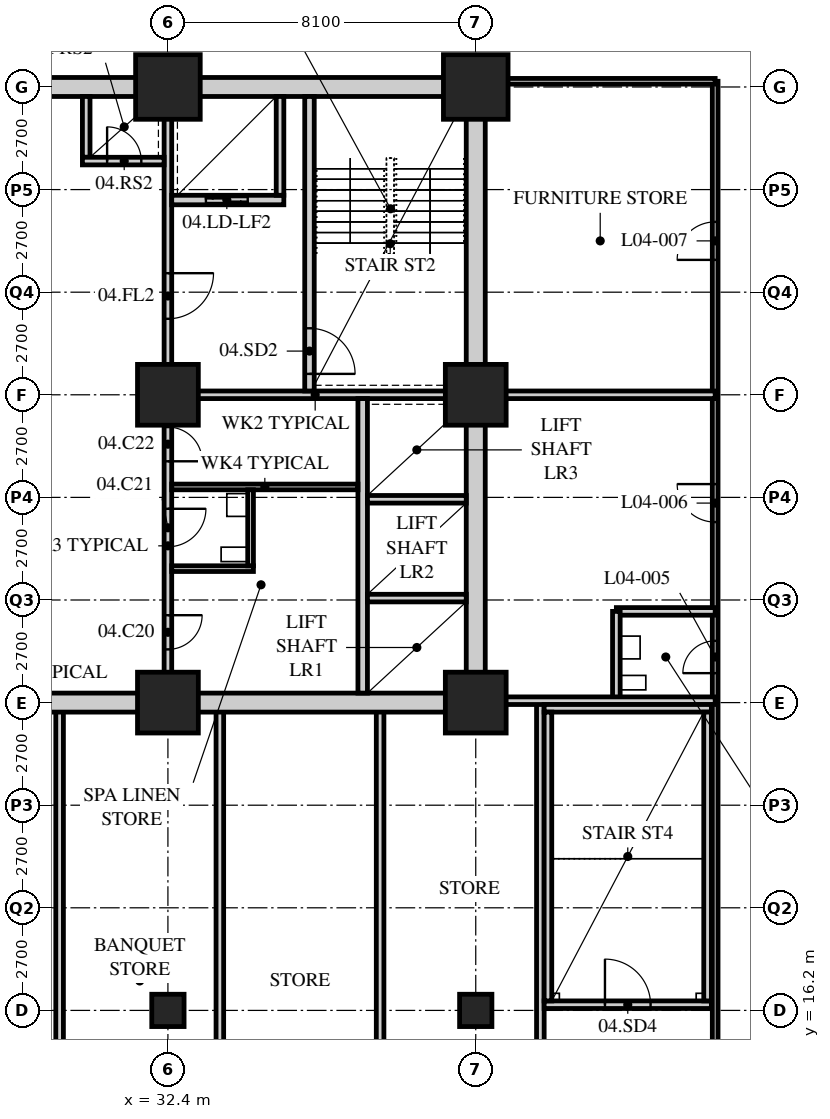
"""IFC4 building model, lengths in metres.
Left out: names, types, materials, properties, quantities, classifications, styles, units other than length and angle.
Written with IfcOpenShell. Run it as: python <this file> out.ifc"""

import sys

from ifc_helpers import new_model, si_unit, direction, frame, frame_2d, origin, origin_2d, place, context, subcontext, project, spatial, rectangle, hollow_rectangle, extrude, element, fill, save


model = new_model("IFC4")
c1 = context("Model", 3, precision=1e-05, world=origin(), true_north=direction((0.0, 1.0)))
c2 = subcontext(c1, "Body", "Model", "MODEL_VIEW")
j1 = project(units=[si_unit("LENGTHUNIT", "METRE"), si_unit("PLANEANGLEUNIT", "RADIAN")], contexts=[c1])
p1 = place(None, origin())
s1 = spatial("IfcSite", under=j1, at=p1, CompositionType="ELEMENT")
p2 = place(p1, origin())
s2 = spatial("IfcBuilding", under=s1, at=p2, CompositionType="ELEMENT")
p3 = place(p2, frame((0.0, 0.0, 22.2)))
s3 = spatial("IfcBuildingStorey", under=s2, at=p3, CompositionType="ELEMENT", Elevation=22.2)
p4 = place(p3, frame((32.4, 16.2, 0.0), z_axis=(0.0, 0.0, 1.0), x_axis=(1.0, 0.0, 0.0)))
e1 = element("IfcColumn", 1, at=p4, inside=s3, PredefinedType="COLUMN", context=c2, shape_type="SweptSolid", body=[
    extrude(hollow_rectangle(XDim=0.85, YDim=0.85, WallThickness=0.085, at=origin_2d()), origin(), (0.0, 0.0, 1.0), 5.4),
])
for number, where, z_axis, x_axis in (
    (2, (32.4, 24.3, 0.0), (0.0, 0.0, 1.0), (1.0, 0.0, 0.0)),
    (3, (32.4, 32.4, 0.0), (0.0, 0.0, 1.0), (1.0, 0.0, 0.0)),
):
    element("IfcColumn", number, at=place(p3, frame(where, z_axis=z_axis, x_axis=x_axis)), inside=s3, PredefinedType="COLUMN", context=c2, shape_type="SweptSolid", body=[
        extrude(hollow_rectangle(XDim=1.6, YDim=1.6, WallThickness=0.15, at=origin_2d()), origin(), (0.0, 0.0, 1.0), 5.4),
    ])
p5 = place(p3, frame((32.4, 40.5, 0.0), z_axis=(0.0, 0.0, 1.0), x_axis=(1.0, 0.0, 0.0)))
e4 = element("IfcColumn", 4, at=p5, inside=s3, PredefinedType="COLUMN", context=c2, shape_type="SweptSolid", body=[
    extrude(hollow_rectangle(XDim=1.7, YDim=1.7, WallThickness=0.16, at=origin_2d()), origin(), (0.0, 0.0, 1.0), 5.4),
])
p6 = place(p3, frame((40.5, 16.2, 0.0), z_axis=(0.0, 0.0, 1.0), x_axis=(1.0, 0.0, 0.0)))
e5 = element("IfcColumn", 5, at=p6, inside=s3, PredefinedType="COLUMN", context=c2, shape_type="SweptSolid", body=[
    extrude(hollow_rectangle(XDim=0.85, YDim=0.85, WallThickness=0.085, at=origin_2d()), origin(), (0.0, 0.0, 1.0), 5.4),
])
for number, where, z_axis, x_axis in (
    (6, (40.5, 24.3, 0.0), (0.0, 0.0, 1.0), (1.0, 0.0, 0.0)),
    (7, (40.5, 32.4, 0.0), (0.0, 0.0, 1.0), (1.0, 0.0, 0.0)),
):
    element("IfcColumn", number, at=place(p3, frame(where, z_axis=z_axis, x_axis=x_axis)), inside=s3, PredefinedType="COLUMN", context=c2, shape_type="SweptSolid", body=[
        extrude(hollow_rectangle(XDim=1.6, YDim=1.6, WallThickness=0.15, at=origin_2d()), origin(), (0.0, 0.0, 1.0), 5.4),
    ])
p7 = place(p3, frame((40.5, 40.5, 0.0), z_axis=(0.0, 0.0, 1.0), x_axis=(1.0, 0.0, 0.0)))
e8 = element("IfcColumn", 8, at=p7, inside=s3, PredefinedType="COLUMN", context=c2, shape_type="SweptSolid", body=[
    extrude(hollow_rectangle(XDim=1.7, YDim=1.7, WallThickness=0.16, at=origin_2d()), origin(), (0.0, 0.0, 1.0), 5.4),
])
p8 = place(p3, frame((46.8, 9.9, 0.0), z_axis=(0.0, 0.0, 1.0), x_axis=(0.0, 1.0, 0.0)))
e9 = element("IfcWall", 9, at=p8, inside=s3, PredefinedType="PARTITIONING", context=c2, shape_type="SweptSolid", body=[
    extrude(rectangle(XDim=30.75, YDim=0.15, at=frame_2d((15.375, 0.0))), origin(), (0.0, 0.0, 1.0), 5.19),
])
p9 = place(p8, frame((15.175, 0.0, 0.0)))
e10 = element("IfcOpeningElement", 10, at=p9, cuts=e9, PredefinedType="OPENING", context=c2, shape_type="SweptSolid", body=[
    extrude(rectangle(XDim=0.85, YDim=2.1, at=frame_2d((0.425, 1.05))), frame((0.0, 0.085, 0.0), z_axis=(0.0, -1.0, 0.0), x_axis=(1.0, 0.0, 0.0)), (0.0, 0.0, 1.0), 0.17),
])
p10 = place(p8, frame((19.15, 0.0, 0.0)))
e11 = element("IfcOpeningElement", 11, at=p10, cuts=e9, PredefinedType="OPENING", context=c2, shape_type="SweptSolid", body=[
    extrude(rectangle(XDim=1.0, YDim=2.1, at=frame_2d((0.5, 1.05))), frame((0.0, 0.085, 0.0), z_axis=(0.0, -1.0, 0.0), x_axis=(1.0, 0.0, 0.0)), (0.0, 0.0, 1.0), 0.17),
])
p11 = place(p8, frame((26.05, 0.0, 0.0)))
e12 = element("IfcOpeningElement", 12, at=p11, cuts=e9, PredefinedType="OPENING", context=c2, shape_type="SweptSolid", body=[
    extrude(rectangle(XDim=1.0, YDim=2.1, at=frame_2d((0.5, 1.05))), frame((0.0, 0.085, 0.0), z_axis=(0.0, -1.0, 0.0), x_axis=(1.0, 0.0, 0.0)), (0.0, 0.0, 1.0), 0.17),
])
p12 = place(p3, frame((46.8, 40.65, 0.0), z_axis=(0.0, 0.0, 1.0), x_axis=(-1.0, 0.0, 0.0)))
e13 = element("IfcWall", 13, at=p12, inside=s3, PredefinedType="PARTITIONING", context=c2, shape_type="SweptSolid", body=[
    extrude(rectangle(XDim=6.168, YDim=0.15, at=frame_2d((3.084, 0.0))), origin(), (0.0, 0.0, 1.0), 4.428),
])
p13 = place(p3, frame((40.5, 32.4, 0.0), z_axis=(0.0, 0.0, 1.0), x_axis=(1.0, 0.0, 0.0)))
e14 = element("IfcWall", 14, at=p13, inside=s3, PredefinedType="SOLIDWALL", context=c2, shape_type="SweptSolid", body=[
    extrude(rectangle(XDim=6.3, YDim=0.2, at=frame_2d((3.15, 0.0))), origin(), (0.0, 0.0, 1.0), 4.428),
])
p14 = place(p3, frame((46.8, 26.7, 0.0), z_axis=(0.0, 0.0, 1.0), x_axis=(-1.0, 0.0, 0.0)))
e15 = element("IfcWall", 15, at=p14, inside=s3, PredefinedType="SOLIDWALL", context=c2, shape_type="SweptSolid", body=[
    extrude(rectangle(XDim=2.6, YDim=0.2, at=frame_2d((1.3, 0.0))), origin(), (0.0, 0.0, 1.0), 5.19),
])
p15 = place(p3, frame((44.2, 24.3, 0.0), z_axis=(0.0, 0.0, 1.0), x_axis=(0.0, 1.0, 0.0)))
e16 = element("IfcWall", 16, at=p15, inside=s3, PredefinedType="SOLIDWALL", context=c2, shape_type="SweptSolid", body=[
    extrude(rectangle(XDim=2.4, YDim=0.2, at=frame_2d((1.2, 0.0))), origin(), (0.0, 0.0, 1.0), 5.19),
])
for number, where, z_axis, x_axis in (
    (17, (33.767, 9.9, 0.0), (0.0, 0.0, 1.0), (0.0, 1.0, 0.0)),
    (18, (37.983, 9.9, 0.0), (0.0, 0.0, 1.0), (0.0, 1.0, 0.0)),
    (19, (42.2, 9.9, 0.0), (0.0, 0.0, 1.0), (0.0, 1.0, 0.0)),
    (20, (29.55, 9.9, 0.0), (0.0, 0.0, 1.0), (0.0, 1.0, 0.0)),
):
    element("IfcWall", number, at=place(p3, frame(where, z_axis=z_axis, x_axis=x_axis)), inside=s3, PredefinedType="SOLIDWALL", context=c2, shape_type="SweptSolid", body=[
        extrude(rectangle(XDim=14.4, YDim=0.2, at=frame_2d((7.2, 0.0))), origin(), (0.0, 0.0, 1.0), 5.19),
    ])
p16 = place(p3, frame((40.5, 24.35, 0.0), z_axis=(0.0, 0.0, 1.0), x_axis=(1.0, 0.0, 0.0)))
e21 = element("IfcWall", 21, at=p16, inside=s3, PredefinedType="SOLIDWALL", context=c2, shape_type="SweptSolid", body=[
    extrude(rectangle(XDim=6.3, YDim=0.2, at=frame_2d((3.15, 0.0))), origin(), (0.0, 0.0, 1.0), 4.428),
])
p17 = place(p3, frame((15.95, 24.3, 0.0), z_axis=(0.0, 0.0, 1.0), x_axis=(1.0, 0.0, 0.0)))
e22 = element("IfcWall", 22, at=p17, inside=s3, PredefinedType="SOLIDWALL", context=c2, shape_type="SweptSolid", body=[
    extrude(rectangle(XDim=24.8, YDim=0.5, at=frame_2d((12.4, 0.0))), origin(), (0.0, 0.0, 1.0), 4.428),
])
p18 = place(p17, frame((11.5, 0.0, 0.0)))
e23 = element("IfcOpeningElement", 23, at=p18, cuts=e22, PredefinedType="OPENING", context=c2, shape_type="SweptSolid", body=[
    extrude(rectangle(XDim=1.8, YDim=2.4, at=frame_2d((0.9, 1.2))), frame((0.0, 0.26, 0.0), z_axis=(0.0, -1.0, 0.0), x_axis=(1.0, 0.0, 0.0)), (0.0, 0.0, 1.0), 0.52),
])
p19 = place(p3, frame((15.95, 40.5, 0.0), z_axis=(0.0, 0.0, 1.0), x_axis=(1.0, 0.0, 0.0)))
e24 = element("IfcWall", 24, at=p19, inside=s3, PredefinedType="SOLIDWALL", context=c2, shape_type="SweptSolid", body=[
    extrude(rectangle(XDim=24.8, YDim=0.5, at=frame_2d((12.4, 0.0))), origin(), (0.0, 0.0, 1.0), 4.428),
])
p20 = place(p19, frame((11.5, 0.0, 0.0)))
e25 = element("IfcOpeningElement", 25, at=p20, cuts=e24, PredefinedType="OPENING", context=c2, shape_type="SweptSolid", body=[
    extrude(rectangle(XDim=1.8, YDim=2.4, at=frame_2d((0.9, 1.2))), frame((0.0, 0.26, 0.0), z_axis=(0.0, -1.0, 0.0), x_axis=(1.0, 0.0, 0.0)), (0.0, 0.0, 1.0), 0.52),
])
p21 = place(p3, frame((40.5, 24.55, 0.0), z_axis=(0.0, 0.0, 1.0), x_axis=(0.0, 1.0, 0.0)))
e26 = element("IfcWall", 26, at=p21, inside=s3, PredefinedType="SOLIDWALL", context=c2, shape_type="SweptSolid", body=[
    extrude(rectangle(XDim=15.7, YDim=0.5, at=frame_2d((7.85, 0.0))), origin(), (0.0, 0.0, 1.0), 4.428),
])
p22 = place(p3, frame((32.3, 32.4, 0.0), z_axis=(0.0, 0.0, 1.0), x_axis=(1.0, 0.0, 0.0)))
e27 = element("IfcWall", 27, at=p22, inside=s3, PredefinedType="SOLIDWALL", context=c2, shape_type="SweptSolid", body=[
    extrude(rectangle(XDim=7.95, YDim=0.2, at=frame_2d((3.975, 0.0))), origin(), (0.0, 0.0, 1.0), 4.428),
])
p23 = place(p3, frame((32.4, 32.5, 0.0), z_axis=(0.0, 0.0, 1.0), x_axis=(0.0, 1.0, 0.0)))
e28 = element("IfcWall", 28, at=p23, inside=s3, PredefinedType="SOLIDWALL", context=c2, shape_type="SweptSolid", body=[
    extrude(rectangle(XDim=7.75, YDim=0.2, at=frame_2d((3.875, 0.0))), origin(), (0.0, 0.0, 1.0), 4.428),
])
p24 = place(p23, frame((1.9, 0.0, 0.0)))
e29 = element("IfcOpeningElement", 29, at=p24, cuts=e28, PredefinedType="OPENING", context=c2, shape_type="SweptSolid", body=[
    extrude(rectangle(XDim=1.2, YDim=2.1, at=frame_2d((0.6, 1.05))), frame((0.0, 0.11, 0.0), z_axis=(0.0, -1.0, 0.0), x_axis=(1.0, 0.0, 0.0)), (0.0, 0.0, 1.0), 0.22),
])
p25 = place(p3, frame((37.525, 24.55, 0.0), z_axis=(0.0, 0.0, 1.0), x_axis=(0.0, 1.0, 0.0)))
e30 = element("IfcWall", 30, at=p25, inside=s3, PredefinedType="SOLIDWALL", context=c2, shape_type="SweptSolid", body=[
    extrude(rectangle(XDim=7.75, YDim=0.25, at=frame_2d((3.875, 0.0))), origin(), (0.0, 0.0, 1.0), 5.19),
])
for number, where, z_axis, x_axis in (
    (31, (37.65, 27.05, 0.0), (0.0, 0.0, 1.0), (1.0, 0.0, 0.0)),
    (32, (37.65, 29.65, 0.0), (0.0, 0.0, 1.0), (1.0, 0.0, 0.0)),
):
    element("IfcWall", number, at=place(p3, frame(where, z_axis=z_axis, x_axis=x_axis)), inside=s3, PredefinedType="SOLIDWALL", context=c2, shape_type="SweptSolid", body=[
        extrude(rectangle(XDim=2.6, YDim=0.2, at=frame_2d((1.3, 0.0))), origin(), (0.0, 0.0, 1.0), 5.19),
    ])
p26 = place(p3, frame((36.125, 32.5, 0.0), z_axis=(0.0, 0.0, 1.0), x_axis=(0.0, 1.0, 0.0)))
e33 = element("IfcWall", 33, at=p26, inside=s3, PredefinedType="SOLIDWALL", context=c2, shape_type="SweptSolid", body=[
    extrude(rectangle(XDim=7.75, YDim=0.25, at=frame_2d((3.875, 0.0))), origin(), (0.0, 0.0, 1.0), 5.19),
])
p27 = place(p26, frame((0.45, 0.0, 0.0)))
e34 = element("IfcOpeningElement", 34, at=p27, cuts=e33, PredefinedType="OPENING", context=c2, shape_type="SweptSolid", body=[
    extrude(rectangle(XDim=1.2, YDim=2.1, at=frame_2d((0.6, 1.05))), frame((0.0, 0.135, 0.0), z_axis=(0.0, -1.0, 0.0), x_axis=(1.0, 0.0, 0.0)), (0.0, 0.0, 1.0), 0.27),
])
p28 = place(p3, frame((32.5, 37.525, 0.0), z_axis=(0.0, 0.0, 1.0), x_axis=(1.0, 0.0, 0.0)))
e35 = element("IfcWall", 35, at=p28, inside=s3, PredefinedType="SOLIDWALL", context=c2, shape_type="SweptSolid", body=[
    extrude(rectangle(XDim=2.95, YDim=0.25, at=frame_2d((1.475, 0.0))), origin(), (0.0, 0.0, 1.0), 5.19),
])
p29 = place(p28, frame((0.9, 0.0, 0.0)))
e36 = element("IfcOpeningElement", 36, at=p29, cuts=e35, PredefinedType="OPENING", context=c2, shape_type="SweptSolid", body=[
    extrude(rectangle(XDim=1.1, YDim=2.4, at=frame_2d((0.55, 1.2))), frame((0.0, 0.135, 0.0), z_axis=(0.0, -1.0, 0.0), x_axis=(1.0, 0.0, 0.0)), (0.0, 0.0, 1.0), 0.27),
])
p30 = place(p3, frame((35.35, 37.65, 0.0), z_axis=(0.0, 0.0, 1.0), x_axis=(0.0, 1.0, 0.0)))
e37 = element("IfcWall", 37, at=p30, inside=s3, PredefinedType="SOLIDWALL", context=c2, shape_type="SweptSolid", body=[
    extrude(rectangle(XDim=2.6, YDim=0.2, at=frame_2d((1.3, 0.0))), origin(), (0.0, 0.0, 1.0), 5.19),
])
p31 = place(p3, frame((30.25, 38.65, 0.0), z_axis=(0.0, 0.0, 1.0), x_axis=(0.0, 1.0, 0.0)))
e38 = element("IfcWall", 38, at=p31, inside=s3, PredefinedType="SOLIDWALL", context=c2, shape_type="SweptSolid", body=[
    extrude(rectangle(XDim=1.6, YDim=0.2, at=frame_2d((0.8, 0.0))), origin(), (0.0, 0.0, 1.0), 5.19),
])
p32 = place(p3, frame((30.15, 38.55, 0.0), z_axis=(0.0, 0.0, 1.0), x_axis=(1.0, 0.0, 0.0)))
e39 = element("IfcWall", 39, at=p32, inside=s3, PredefinedType="SOLIDWALL", context=c2, shape_type="SweptSolid", body=[
    extrude(rectangle(XDim=2.15, YDim=0.2, at=frame_2d((1.075, 0.0))), origin(), (0.0, 0.0, 1.0), 5.19),
])
p33 = place(p32, frame((0.65, 0.0, 0.0)))
e40 = element("IfcOpeningElement", 40, at=p33, cuts=e39, PredefinedType="OPENING", context=c2, shape_type="SweptSolid", body=[
    extrude(rectangle(XDim=0.9, YDim=2.1, at=frame_2d((0.45, 1.05))), frame((0.0, 0.11, 0.0), z_axis=(0.0, -1.0, 0.0), x_axis=(1.0, 0.0, 0.0)), (0.0, 0.0, 1.0), 0.22),
])
p34 = place(p3, frame((32.4, 24.55, 0.0), z_axis=(0.0, 0.0, 1.0), x_axis=(0.0, 1.0, 0.0)))
e41 = element("IfcWall", 41, at=p34, inside=s3, PredefinedType="PARTITIONING", context=c2, shape_type="SweptSolid", body=[
    extrude(rectangle(XDim=7.75, YDim=0.2, at=frame_2d((3.875, 0.0))), origin(), (0.0, 0.0, 1.0), 4.428),
])
p35 = place(p34, frame((1.15, 0.0, 0.0)))
e42 = element("IfcOpeningElement", 42, at=p35, cuts=e41, PredefinedType="OPENING", context=c2, shape_type="SweptSolid", body=[
    extrude(rectangle(XDim=0.9, YDim=2.1, at=frame_2d((0.45, 1.05))), frame((0.0, 0.11, 0.0), z_axis=(0.0, -1.0, 0.0), x_axis=(1.0, 0.0, 0.0)), (0.0, 0.0, 1.0), 0.22),
])
p36 = place(p34, frame((3.85, 0.0, 0.0)))
e43 = element("IfcOpeningElement", 43, at=p36, cuts=e41, PredefinedType="OPENING", context=c2, shape_type="SweptSolid", body=[
    extrude(rectangle(XDim=1.0, YDim=2.1, at=frame_2d((0.5, 1.05))), frame((0.0, 0.11, 0.0), z_axis=(0.0, -1.0, 0.0), x_axis=(1.0, 0.0, 0.0)), (0.0, 0.0, 1.0), 0.22),
])
p37 = place(p34, frame((6.1, 0.0, 0.0)))
e44 = element("IfcOpeningElement", 44, at=p37, cuts=e41, PredefinedType="OPENING", context=c2, shape_type="SweptSolid", body=[
    extrude(rectangle(XDim=0.9, YDim=2.1, at=frame_2d((0.45, 1.05))), frame((0.0, 0.11, 0.0), z_axis=(0.0, -1.0, 0.0), x_axis=(1.0, 0.0, 0.0)), (0.0, 0.0, 1.0), 0.22),
])
p38 = place(p3, frame((32.5, 27.825, 0.0), z_axis=(0.0, 0.0, 1.0), x_axis=(1.0, 0.0, 0.0)))
e45 = element("IfcWall", 45, at=p38, inside=s3, PredefinedType="PARTITIONING", context=c2, shape_type="SweptSolid", body=[
    extrude(rectangle(XDim=2.15, YDim=0.15, at=frame_2d((1.075, 0.0))), origin(), (0.0, 0.0, 1.0), 5.19),
])
p39 = place(p3, frame((32.5, 29.975, 0.0), z_axis=(0.0, 0.0, 1.0), x_axis=(1.0, 0.0, 0.0)))
e46 = element("IfcWall", 46, at=p39, inside=s3, PredefinedType="PARTITIONING", context=c2, shape_type="SweptSolid", body=[
    extrude(rectangle(XDim=4.9, YDim=0.15, at=frame_2d((2.45, 0.0))), origin(), (0.0, 0.0, 1.0), 5.19),
])
p40 = place(p3, frame((34.575, 27.9, 0.0), z_axis=(0.0, 0.0, 1.0), x_axis=(0.0, 1.0, 0.0)))
e47 = element("IfcWall", 47, at=p40, inside=s3, PredefinedType="PARTITIONING", context=c2, shape_type="SweptSolid", body=[
    extrude(rectangle(XDim=2.0, YDim=0.15, at=frame_2d((1.0, 0.0))), origin(), (0.0, 0.0, 1.0), 5.19),
])
p41 = place(p3, frame((42.3, 16.35, 0.0), z_axis=(0.0, 0.0, 1.0), x_axis=(1.0, 0.0, 0.0)))
e48 = element("IfcWall", 48, at=p41, inside=s3, PredefinedType="SOLIDWALL", context=c2, shape_type="SweptSolid", body=[
    extrude(rectangle(XDim=4.4, YDim=0.2, at=frame_2d((2.2, 0.0))), origin(), (0.0, 0.0, 1.0), 4.428),
])
p42 = place(p41, frame((1.6, 0.0, 0.0)))
e49 = element("IfcOpeningElement", 49, at=p42, cuts=e48, PredefinedType="OPENING", context=c2, shape_type="SweptSolid", body=[
    extrude(rectangle(XDim=1.2, YDim=2.1, at=frame_2d((0.6, 1.05))), frame((0.0, 0.11, 0.0), z_axis=(0.0, -1.0, 0.0), x_axis=(1.0, 0.0, 0.0)), (0.0, 0.0, 1.0), 0.22),
])
p43 = place(p3, frame((42.3, 24.15, 0.0), z_axis=(0.0, 0.0, 1.0), x_axis=(1.0, 0.0, 0.0)))
e50 = element("IfcWall", 50, at=p43, inside=s3, PredefinedType="SOLIDWALL", context=c2, shape_type="SweptSolid", body=[
    extrude(rectangle(XDim=4.4, YDim=0.2, at=frame_2d((2.2, 0.0))), origin(), (0.0, 0.0, 1.0), 4.428),
])
for number, where, z_axis, x_axis in (
    (51, (42.4, 16.45, 0.0), (0.0, 0.0, 1.0), (0.0, 1.0, 0.0)),
    (52, (46.6, 16.45, 0.0), (0.0, 0.0, 1.0), (0.0, 1.0, 0.0)),
):
    element("IfcWall", number, at=place(p3, frame(where, z_axis=z_axis, x_axis=x_axis)), inside=s3, PredefinedType="SOLIDWALL", context=c2, shape_type="SweptSolid", body=[
        extrude(rectangle(XDim=7.6, YDim=0.2, at=frame_2d((3.8, 0.0))), origin(), (0.0, 0.0, 1.0), 5.19),
    ])
p44 = place(p9, origin())
e53 = element("IfcDoor", 53, at=p44, inside=s3, OperationType="SINGLE_SWING_LEFT", PredefinedType="DOOR", context=c2, shape_type="SweptSolid", body=[
    extrude(rectangle(XDim=0.85, YDim=2.1, at=frame_2d((0.425, 1.05))), frame((0.0, 0.025, 0.0), z_axis=(0.0, -1.0, 0.0), x_axis=(1.0, 0.0, 0.0)), (0.0, 0.0, 1.0), 0.05),
])
fill(e10, e53)
p45 = place(p10, origin())
e54 = element("IfcDoor", 54, at=p45, inside=s3, OperationType="SINGLE_SWING_RIGHT", PredefinedType="DOOR", context=c2, shape_type="SweptSolid", body=[
    extrude(rectangle(XDim=1.0, YDim=2.1, at=frame_2d((0.5, 1.05))), frame((0.0, 0.025, 0.0), z_axis=(0.0, -1.0, 0.0), x_axis=(1.0, 0.0, 0.0)), (0.0, 0.0, 1.0), 0.05),
])
fill(e11, e54)
p46 = place(p11, origin())
e55 = element("IfcDoor", 55, at=p46, inside=s3, OperationType="SINGLE_SWING_LEFT", PredefinedType="DOOR", context=c2, shape_type="SweptSolid", body=[
    extrude(rectangle(XDim=1.0, YDim=2.1, at=frame_2d((0.5, 1.05))), frame((0.0, 0.025, 0.0), z_axis=(0.0, -1.0, 0.0), x_axis=(1.0, 0.0, 0.0)), (0.0, 0.0, 1.0), 0.05),
])
fill(e12, e55)
p47 = place(p35, origin())
e56 = element("IfcDoor", 56, at=p47, inside=s3, OperationType="SINGLE_SWING_LEFT", PredefinedType="DOOR", context=c2, shape_type="SweptSolid", body=[
    extrude(rectangle(XDim=0.9, YDim=2.1, at=frame_2d((0.45, 1.05))), frame((0.0, 0.025, 0.0), z_axis=(0.0, -1.0, 0.0), x_axis=(1.0, 0.0, 0.0)), (0.0, 0.0, 1.0), 0.05),
])
fill(e42, e56)
p48 = place(p36, origin())
e57 = element("IfcDoor", 57, at=p48, inside=s3, OperationType="SINGLE_SWING_LEFT", PredefinedType="DOOR", context=c2, shape_type="SweptSolid", body=[
    extrude(rectangle(XDim=1.0, YDim=2.1, at=frame_2d((0.5, 1.05))), frame((0.0, 0.025, 0.0), z_axis=(0.0, -1.0, 0.0), x_axis=(1.0, 0.0, 0.0)), (0.0, 0.0, 1.0), 0.05),
])
fill(e43, e57)
p49 = place(p37, origin())
e58 = element("IfcDoor", 58, at=p49, inside=s3, OperationType="SINGLE_SWING_RIGHT", PredefinedType="DOOR", context=c2, shape_type="SweptSolid", body=[
    extrude(rectangle(XDim=0.9, YDim=2.1, at=frame_2d((0.45, 1.05))), frame((0.0, 0.025, 0.0), z_axis=(0.0, -1.0, 0.0), x_axis=(1.0, 0.0, 0.0)), (0.0, 0.0, 1.0), 0.05),
])
fill(e44, e58)
p50 = place(p27, origin())
e59 = element("IfcDoor", 59, at=p50, inside=s3, OperationType="SINGLE_SWING_RIGHT", PredefinedType="DOOR", context=c2, shape_type="SweptSolid", body=[
    extrude(rectangle(XDim=1.2, YDim=2.1, at=frame_2d((0.6, 1.05))), frame((0.0, 0.025, 0.0), z_axis=(0.0, -1.0, 0.0), x_axis=(1.0, 0.0, 0.0)), (0.0, 0.0, 1.0), 0.05),
])
fill(e34, e59)
p51 = place(p24, origin())
e60 = element("IfcDoor", 60, at=p51, inside=s3, OperationType="SINGLE_SWING_LEFT", PredefinedType="DOOR", context=c2, shape_type="SweptSolid", body=[
    extrude(rectangle(XDim=1.2, YDim=2.1, at=frame_2d((0.6, 1.05))), frame((0.0, 0.025, 0.0), z_axis=(0.0, -1.0, 0.0), x_axis=(1.0, 0.0, 0.0)), (0.0, 0.0, 1.0), 0.05),
])
fill(e29, e60)
p52 = place(p33, origin())
e61 = element("IfcDoor", 61, at=p52, inside=s3, OperationType="SINGLE_SWING_LEFT", PredefinedType="DOOR", context=c2, shape_type="SweptSolid", body=[
    extrude(rectangle(XDim=0.9, YDim=2.1, at=frame_2d((0.45, 1.05))), frame((0.0, 0.025, 0.0), z_axis=(0.0, -1.0, 0.0), x_axis=(1.0, 0.0, 0.0)), (0.0, 0.0, 1.0), 0.05),
])
fill(e40, e61)
p53 = place(p29, origin())
e62 = element("IfcDoor", 62, at=p53, inside=s3, OperationType="DOUBLE_DOOR_SLIDING", PredefinedType="DOOR", context=c2, shape_type="SweptSolid", body=[
    extrude(rectangle(XDim=1.1, YDim=2.4, at=frame_2d((0.55, 1.2))), frame((0.0, 0.025, 0.0), z_axis=(0.0, -1.0, 0.0), x_axis=(1.0, 0.0, 0.0)), (0.0, 0.0, 1.0), 0.05),
])
fill(e36, e62)
p54 = place(p42, origin())
e63 = element("IfcDoor", 63, at=p54, inside=s3, OperationType="SINGLE_SWING_LEFT", PredefinedType="DOOR", context=c2, shape_type="SweptSolid", body=[
    extrude(rectangle(XDim=1.2, YDim=2.1, at=frame_2d((0.6, 1.05))), frame((0.0, 0.025, 0.0), z_axis=(0.0, -1.0, 0.0), x_axis=(1.0, 0.0, 0.0)), (0.0, 0.0, 1.0), 0.05),
])
fill(e49, e63)
save(model, sys.argv[1])
